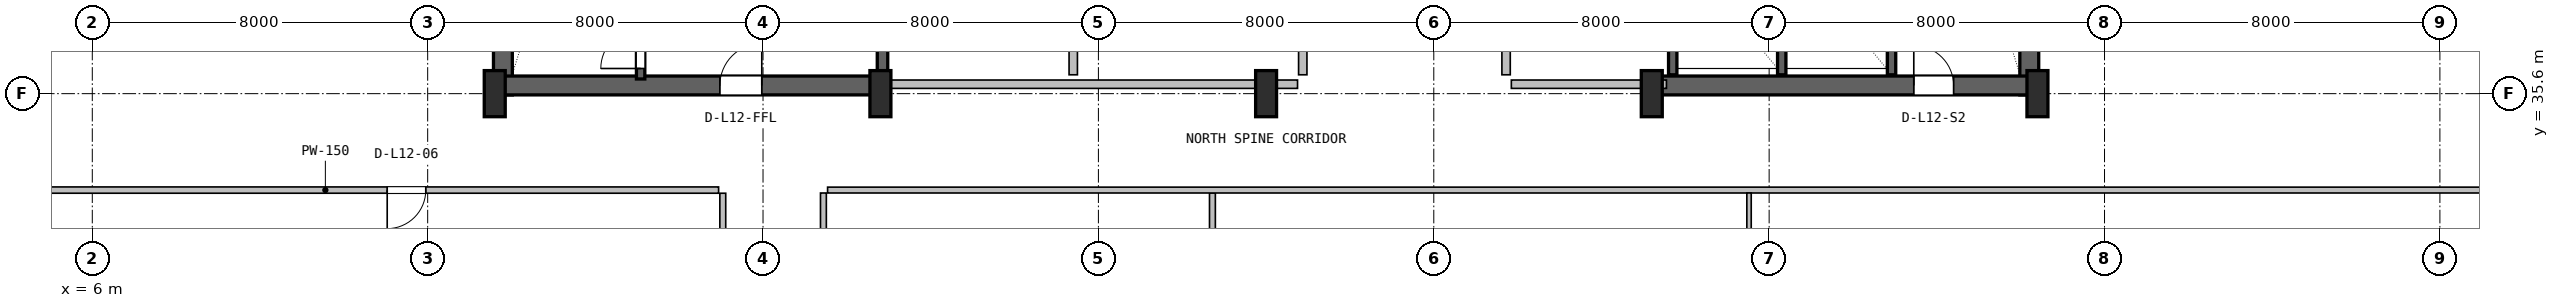
"""IFC4 building model, lengths in metres.
Left out: names, types, materials, properties, quantities, classifications, styles, units other than length and angle.
Written with IfcOpenShell. Run it as: python <this file> out.ifc"""

import sys

from ifc_helpers import new_model, si_unit, direction, frame, frame_2d, origin, origin_2d, place, context, subcontext, project, spatial, rectangle, i_section, extrude, source, transform, mapped, element, fill, save


model = new_model("IFC4")
c1 = context("Model", 3, precision=1e-05, world=origin(), true_north=direction((0.0, 1.0)))
c2 = subcontext(c1, "Body", "Model", "MODEL_VIEW")
j1 = project(units=[si_unit("LENGTHUNIT", "METRE"), si_unit("PLANEANGLEUNIT", "RADIAN")], contexts=[c1])
p1 = place(None, origin())
s1 = spatial("IfcSite", under=j1, at=p1, CompositionType="ELEMENT")
p2 = place(p1, origin())
s2 = spatial("IfcBuilding", under=s1, at=p2, CompositionType="ELEMENT")
p3 = place(p2, frame((0.0, 0.0, 54.9)))
s3 = spatial("IfcBuildingStorey", under=s2, at=p3, CompositionType="ELEMENT", Elevation=54.9)
for number, where, z_axis, x_axis in (
    (1, (15.795, 35.57, 0.0), (0.0, 0.0, 1.0), (0.0, 1.0, 0.0)),
    (2, (52.205, 35.57, 0.0), (0.0, 0.0, 1.0), (0.0, 1.0, 0.0)),
):
    element("IfcWall", number, at=place(p3, frame(where, z_axis=z_axis, x_axis=x_axis)), inside=s3, PredefinedType="SHEAR", context=c2, shape_type="SweptSolid", body=[
        extrude(rectangle(XDim=11.23, YDim=0.45, at=frame_2d((5.615, 0.0))), origin(), (0.0, 0.0, 1.0), 3.65),
    ])
p4 = place(p3, frame((15.57, 35.795, 0.0), z_axis=(0.0, 0.0, 1.0), x_axis=(1.0, 0.0, 0.0)))
e3 = element("IfcWall", 3, at=p4, inside=s3, PredefinedType="SHEAR", context=c2, shape_type="SweptSolid", body=[
    extrude(rectangle(XDim=9.23, YDim=0.45, at=frame_2d((4.615, 0.0))), origin(), (0.0, 0.0, 1.0), 3.65),
])
p5 = place(p4, frame((5.4, 0.0, 0.0)))
e4 = element("IfcOpeningElement", 4, at=p5, cuts=e3, PredefinedType="OPENING", context=c2, shape_type="SweptSolid", body=[
    extrude(rectangle(XDim=1.0, YDim=2.1, at=frame_2d((0.5, 1.05))), frame((0.0, 0.235, 0.0), z_axis=(0.0, -1.0, 0.0), x_axis=(1.0, 0.0, 0.0)), (0.0, 0.0, 1.0), 0.47),
])
p6 = place(p3, frame((43.2, 35.795, 0.0), z_axis=(0.0, 0.0, 1.0), x_axis=(1.0, 0.0, 0.0)))
e5 = element("IfcWall", 5, at=p6, inside=s3, PredefinedType="SHEAR", context=c2, shape_type="SweptSolid", body=[
    extrude(rectangle(XDim=9.23, YDim=0.45, at=frame_2d((4.615, 0.0))), origin(), (0.0, 0.0, 1.0), 3.65),
])
p7 = place(p6, frame((6.25, 0.0, 0.0)))
e6 = element("IfcOpeningElement", 6, at=p7, cuts=e5, PredefinedType="OPENING", context=c2, shape_type="SweptSolid", body=[
    extrude(rectangle(XDim=0.95, YDim=2.1, at=frame_2d((0.475, 1.05))), frame((0.0, 0.235, 0.0), z_axis=(0.0, -1.0, 0.0), x_axis=(1.0, 0.0, 0.0)), (0.0, 0.0, 1.0), 0.47),
])
m1 = source(origin(), c2, "Body", "SweptSolid", [
    extrude(i_section(OverallWidth=0.5, OverallDepth=1.1, WebThickness=0.018, FlangeThickness=0.032, FilletRadius=0.018, at=origin_2d()), origin(), (0.0, 0.0, 1.0), 3.9),
])
for number, where, z_axis, x_axis in (
    (7, (15.6, 35.6, 0.0), (0.0, 0.0, 1.0), (1.0, 0.0, 0.0)),
    (8, (24.8, 35.6, 0.0), (0.0, 0.0, 1.0), (1.0, 0.0, 0.0)),
    (9, (34.0, 35.6, 0.0), (0.0, 0.0, 1.0), (1.0, 0.0, 0.0)),
    (10, (43.2, 35.6, 0.0), (0.0, 0.0, 1.0), (1.0, 0.0, 0.0)),
    (11, (52.4, 35.6, 0.0), (0.0, 0.0, 1.0), (1.0, 0.0, 0.0)),
):
    element("IfcColumn", number, at=place(p3, frame(where, z_axis=z_axis, x_axis=x_axis)), inside=s3, PredefinedType="COLUMN", context=c2, shape_type="MappedRepresentation", body=[
        mapped(m1, transform((0.0, 0.0, 0.0), x_axis=(1.0, 0.0, 0.0), y_axis=(0.0, 1.0, 0.0), z_axis=(0.0, 0.0, 1.0), scale=1.0)),
    ])
p8 = place(p3, frame((19.08, 35.95, 0.0), z_axis=(0.0, 0.0, 1.0), x_axis=(0.0, 1.0, 0.0)))
e12 = element("IfcWall", 12, at=p8, inside=s3, PredefinedType="SHEAR", context=c2, shape_type="SweptSolid", body=[
    extrude(rectangle(XDim=9.65, YDim=0.2, at=frame_2d((4.825, 0.0))), origin(), (0.0, 0.0, 1.0), 3.65),
])
p9 = place(p8, frame((0.25, 0.0, 0.0)))
e13 = element("IfcOpeningElement", 13, at=p9, cuts=e12, PredefinedType="OPENING", context=c2, shape_type="SweptSolid", body=[
    extrude(rectangle(XDim=0.95, YDim=2.1, at=frame_2d((0.475, 1.05))), frame((0.0, 0.11, 0.0), z_axis=(0.0, -1.0, 0.0), x_axis=(1.0, 0.0, 0.0)), (0.0, 0.0, 1.0), 0.22),
])
p10 = place(p3, frame((24.85, 36.05, 0.0), z_axis=(0.0, 0.0, 1.0), x_axis=(0.0, 1.0, 0.0)))
e14 = element("IfcWall", 14, at=p10, inside=s3, PredefinedType="SHEAR", context=c2, shape_type="SweptSolid", body=[
    extrude(rectangle(XDim=10.45, YDim=0.25, at=frame_2d((5.225, 0.0))), origin(), (0.0, 0.0, 1.0), 3.65),
])
p11 = place(p3, frame((48.92, 36.05, 0.0), z_axis=(0.0, 0.0, 1.0), x_axis=(0.0, 1.0, 0.0)))
e15 = element("IfcWall", 15, at=p11, inside=s3, PredefinedType="SHEAR", context=c2, shape_type="SweptSolid", body=[
    extrude(rectangle(XDim=10.5, YDim=0.2, at=frame_2d((5.25, 0.0))), origin(), (0.0, 0.0, 1.0), 3.65),
])
for number, where, z_axis, x_axis in (
    (16, (43.7, 36.05, 0.0), (0.0, 0.0, 1.0), (0.0, 1.0, 0.0)),
    (17, (46.3, 36.05, 0.0), (0.0, 0.0, 1.0), (0.0, 1.0, 0.0)),
):
    element("IfcWall", number, at=place(p3, frame(where, z_axis=z_axis, x_axis=x_axis)), inside=s3, PredefinedType="SHEAR", context=c2, shape_type="SweptSolid", body=[
        extrude(rectangle(XDim=3.05, YDim=0.2, at=frame_2d((1.525, 0.0))), origin(), (0.0, 0.0, 1.0), 3.65),
    ])
p12 = place(p3, frame((25.0, 35.825, 0.0), z_axis=(0.0, 0.0, 1.0), x_axis=(1.0, 0.0, 0.0)))
e18 = element("IfcWall", 18, at=p12, inside=s3, PredefinedType="PLUMBINGWALL", context=c2, shape_type="SweptSolid", body=[
    extrude(rectangle(XDim=9.75, YDim=0.2, at=frame_2d((4.875, 0.0))), origin(), (0.0, 0.0, 1.0), 2.425),
])
for number, where, z_axis, x_axis in (
    (19, (29.4, 36.05, 0.0), (0.0, 0.0, 1.0), (0.0, 1.0, 0.0)),
    (20, (34.875, 36.05, 0.0), (0.0, 0.0, 1.0), (0.0, 1.0, 0.0)),
):
    element("IfcWall", number, at=place(p3, frame(where, z_axis=z_axis, x_axis=x_axis)), inside=s3, PredefinedType="PLUMBINGWALL", context=c2, shape_type="SweptSolid", body=[
        extrude(rectangle(XDim=3.1, YDim=0.2, at=frame_2d((1.55, 0.0))), origin(), (0.0, 0.0, 1.0), 3.63),
    ])
p13 = place(p3, frame((39.85, 35.825, 0.0), z_axis=(0.0, 0.0, 1.0), x_axis=(1.0, 0.0, 0.0)))
e21 = element("IfcWall", 21, at=p13, inside=s3, PredefinedType="SOLIDWALL", context=c2, shape_type="SweptSolid", body=[
    extrude(rectangle(XDim=3.7, YDim=0.2, at=frame_2d((1.85, 0.0))), origin(), (0.0, 0.0, 1.0), 2.425),
])
p14 = place(p3, frame((39.725, 36.05, 0.0), z_axis=(0.0, 0.0, 1.0), x_axis=(0.0, 1.0, 0.0)))
e22 = element("IfcWall", 22, at=p14, inside=s3, PredefinedType="SOLIDWALL", context=c2, shape_type="SweptSolid", body=[
    extrude(rectangle(XDim=3.1, YDim=0.2, at=frame_2d((1.55, 0.0))), origin(), (0.0, 0.0, 1.0), 3.63),
])
p15 = place(p3, frame((21.04, 1.38, 0.0), z_axis=(0.0, 0.0, 1.0), x_axis=(0.0, 1.0, 0.0)))
e23 = element("IfcWall", 23, at=p15, inside=s3, PredefinedType="PARTITIONING", context=c2, shape_type="SweptSolid", body=[
    extrude(rectangle(XDim=31.845, YDim=0.14, at=frame_2d((15.923, 0.0))), origin(), (0.0, 0.0, 1.0), 3.208),
])
p16 = place(p15, frame((7.0, 0.0, 0.0)))
e24 = element("IfcOpeningElement", 24, at=p16, cuts=e23, PredefinedType="OPENING", context=c2, shape_type="SweptSolid", body=[
    extrude(rectangle(XDim=1.0, YDim=2.1, at=frame_2d((0.5, 1.05))), frame((0.0, 0.08, 0.0), z_axis=(0.0, -1.0, 0.0), x_axis=(1.0, 0.0, 0.0)), (0.0, 0.0, 1.0), 0.16),
])
p17 = place(p15, frame((17.275, 0.0, 0.0)))
e25 = element("IfcOpeningElement", 25, at=p17, cuts=e23, PredefinedType="OPENING", context=c2, shape_type="SweptSolid", body=[
    extrude(rectangle(XDim=0.88, YDim=2.06, at=frame_2d((0.44, 1.03))), frame((0.0, 0.08, 0.0), z_axis=(0.0, -1.0, 0.0), x_axis=(1.0, 0.0, 0.0)), (0.0, 0.0, 1.0), 0.16),
])
p18 = place(p3, frame((2.18, 33.3, 0.0), z_axis=(0.0, 0.0, 1.0), x_axis=(1.0, 0.0, 0.0)))
e26 = element("IfcWall", 26, at=p18, inside=s3, PredefinedType="PARTITIONING", context=c2, shape_type="SweptSolid", body=[
    extrude(rectangle(XDim=18.76, YDim=0.15, at=frame_2d((9.38, 0.0))), origin(), (0.0, 0.0, 1.0), 3.208),
])
p19 = place(p18, frame((10.855, 0.0, 0.0)))
e27 = element("IfcOpeningElement", 27, at=p19, cuts=e26, PredefinedType="OPENING", context=c2, shape_type="SweptSolid", body=[
    extrude(rectangle(XDim=0.92, YDim=2.08, at=frame_2d((0.46, 1.04))), frame((0.0, 0.085, 0.0), z_axis=(0.0, -1.0, 0.0), x_axis=(1.0, 0.0, 0.0)), (0.0, 0.0, 1.0), 0.17),
])
p20 = place(p3, frame((32.72, 12.58, 0.0), z_axis=(0.0, 0.0, 1.0), x_axis=(0.0, 1.0, 0.0)))
e28 = element("IfcWall", 28, at=p20, inside=s3, PredefinedType="PARTITIONING", context=c2, shape_type="SweptSolid", body=[
    extrude(rectangle(XDim=20.65, YDim=0.14, at=frame_2d((10.325, 0.0))), origin(), (0.0, 0.0, 1.0), 2.852),
])
p21 = place(p3, frame((23.54, 33.3, 0.0), z_axis=(0.0, 0.0, 1.0), x_axis=(1.0, 0.0, 0.0)))
e29 = element("IfcWall", 29, at=p21, inside=s3, PredefinedType="PARTITIONING", context=c2, shape_type="SweptSolid", body=[
    extrude(rectangle(XDim=42.28, YDim=0.14, at=frame_2d((21.14, 0.0))), origin(), (0.0, 0.0, 1.0), 2.852),
])
p22 = place(p3, frame((23.44, 12.58, 0.0), z_axis=(0.0, 0.0, 1.0), x_axis=(0.0, 1.0, 0.0)))
e30 = element("IfcWall", 30, at=p22, inside=s3, PredefinedType="PARTITIONING", context=c2, shape_type="SweptSolid", body=[
    extrude(rectangle(XDim=20.65, YDim=0.14, at=frame_2d((10.325, 0.0))), origin(), (0.0, 0.0, 1.0), 3.322),
])
p23 = place(p22, frame((9.825, 0.0, 0.0)))
e31 = element("IfcOpeningElement", 31, at=p23, cuts=e30, PredefinedType="OPENING", context=c2, shape_type="SweptSolid", body=[
    extrude(rectangle(XDim=1.0, YDim=2.1, at=frame_2d((0.5, 1.05))), frame((0.0, 0.08, 0.0), z_axis=(0.0, -1.0, 0.0), x_axis=(1.0, 0.0, 0.0)), (0.0, 0.0, 1.0), 0.16),
])
p24 = place(p3, frame((45.52, 12.58, 0.0), z_axis=(0.0, 0.0, 1.0), x_axis=(0.0, 1.0, 0.0)))
e32 = element("IfcWall", 32, at=p24, inside=s3, PredefinedType="PARTITIONING", context=c2, shape_type="SweptSolid", body=[
    extrude(rectangle(XDim=20.65, YDim=0.105, at=frame_2d((10.325, 0.0))), origin(), (0.0, 0.0, 1.0), 3.322),
])
m2 = source(origin(), c2, "Body", "SweptSolid", [
    extrude(rectangle(XDim=0.95, YDim=2.1, at=frame_2d((0.475, 1.05))), frame((0.0, 0.025, 0.0), z_axis=(0.0, -1.0, 0.0), x_axis=(1.0, 0.0, 0.0)), (0.0, 0.0, 1.0), 0.05),
])
p25 = place(p9, origin())
e33 = element("IfcDoor", 33, at=p25, inside=s3, OperationType="SINGLE_SWING_LEFT", PredefinedType="DOOR", context=c2, shape_type="MappedRepresentation", body=[
    mapped(m2, transform((0.0, 0.0, 0.0), x_axis=(1.0, 0.0, 0.0), y_axis=(0.0, 1.0, 0.0), z_axis=(0.0, 0.0, 1.0), scale=1.0)),
])
fill(e13, e33)
m3 = source(origin(), c2, "Body", "SweptSolid", [
    extrude(rectangle(XDim=1.0, YDim=2.1, at=frame_2d((0.5, 1.05))), frame((0.0, 0.025, 0.0), z_axis=(0.0, -1.0, 0.0), x_axis=(1.0, 0.0, 0.0)), (0.0, 0.0, 1.0), 0.05),
])
p26 = place(p5, origin())
e34 = element("IfcDoor", 34, at=p26, inside=s3, OperationType="SINGLE_SWING_RIGHT", PredefinedType="DOOR", context=c2, shape_type="MappedRepresentation", body=[
    mapped(m3, transform((0.0, 0.0, 0.0), x_axis=(1.0, 0.0, 0.0), y_axis=(0.0, 1.0, 0.0), z_axis=(0.0, 0.0, 1.0), scale=1.0)),
])
fill(e4, e34)
p27 = place(p7, origin())
e35 = element("IfcDoor", 35, at=p27, inside=s3, OperationType="SINGLE_SWING_LEFT", PredefinedType="DOOR", context=c2, shape_type="MappedRepresentation", body=[
    mapped(m2, transform((0.0, 0.0, 0.0), x_axis=(1.0, 0.0, 0.0), y_axis=(0.0, 1.0, 0.0), z_axis=(0.0, 0.0, 1.0), scale=1.0)),
])
fill(e6, e35)
m4 = source(origin(), c2, "Body", "SweptSolid", [
    extrude(rectangle(XDim=0.92, YDim=2.08, at=frame_2d((0.46, 1.04))), frame((0.0, 0.025, 0.0), z_axis=(0.0, -1.0, 0.0), x_axis=(1.0, 0.0, 0.0)), (0.0, 0.0, 1.0), 0.05),
])
p28 = place(p19, frame((0.92, 0.0, 0.0), z_axis=(0.0, 0.0, 1.0), x_axis=(-1.0, 0.0, 0.0)))
e36 = element("IfcDoor", 36, at=p28, inside=s3, OperationType="SINGLE_SWING_LEFT", PredefinedType="DOOR", context=c2, shape_type="MappedRepresentation", body=[
    mapped(m4, transform((0.0, 0.0, 0.0), x_axis=(1.0, 0.0, 0.0), y_axis=(0.0, 1.0, 0.0), z_axis=(0.0, 0.0, 1.0), scale=1.0)),
])
fill(e27, e36)
save(model, sys.argv[1])
